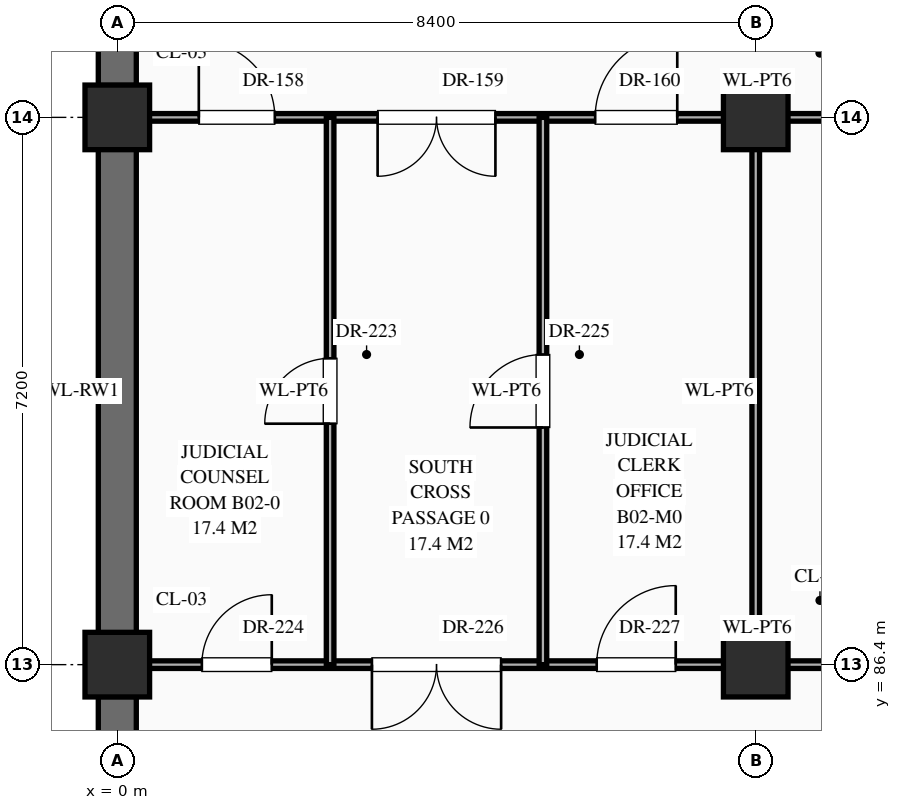
"""IFC4 building model, lengths in metres.
Left out: names, types, materials, properties, quantities, classifications, styles, units other than length and angle.
Written with IfcOpenShell. Run it as: python <this file> out.ifc"""

import sys

from ifc_helpers import new_model, si_unit, direction, frame, frame_2d, origin, origin_2d, place, context, subcontext, project, spatial, rectangle, extrude, element, fill, save


model = new_model("IFC4")
c1 = context("Model", 3, precision=1e-05, world=origin(), true_north=direction((0.0, 1.0)))
c2 = subcontext(c1, "Body", "Model", "MODEL_VIEW")
j1 = project(units=[si_unit("LENGTHUNIT", "METRE"), si_unit("PLANEANGLEUNIT", "RADIAN")], contexts=[c1])
p1 = place(None, origin())
s1 = spatial("IfcSite", under=j1, at=p1, CompositionType="ELEMENT")
p2 = place(p1, origin())
s2 = spatial("IfcBuilding", under=s1, at=p2, CompositionType="ELEMENT")
p3 = place(p2, frame((0.0, 0.0, -10.2)))
s3 = spatial("IfcBuildingStorey", under=s2, at=p3, CompositionType="ELEMENT", Elevation=-10.2)
for number, where, z_axis, x_axis in (
    (1, (0.0, 86.4, 0.0), (0.0, 0.0, 1.0), (1.0, 0.0, 0.0)),
    (2, (0.0, 93.6, 0.0), (0.0, 0.0, 1.0), (1.0, 0.0, 0.0)),
    (3, (8.4, 86.4, 0.0), (0.0, 0.0, 1.0), (1.0, 0.0, 0.0)),
    (4, (8.4, 93.6, 0.0), (0.0, 0.0, 1.0), (1.0, 0.0, 0.0)),
):
    element("IfcColumn", number, at=place(p3, frame(where, z_axis=z_axis, x_axis=x_axis)), inside=s3, PredefinedType="COLUMN", context=c2, shape_type="SweptSolid", body=[
        extrude(rectangle(XDim=0.85, YDim=0.85, at=origin_2d()), origin(), (0.0, 0.0, 1.0), 4.8),
    ])
for number, where, z_axis, x_axis in (
    (5, (0.0, 79.62, 0.0), (0.0, 0.0, 1.0), (0.0, 1.0, 0.0)),
    (6, (0.0, 86.82, 0.0), (0.0, 0.0, 1.0), (0.0, 1.0, 0.0)),
    (7, (0.0, 94.02, 0.0), (0.0, 0.0, 1.0), (0.0, 1.0, 0.0)),
):
    element("IfcWall", number, at=place(p3, frame(where, z_axis=z_axis, x_axis=x_axis)), inside=s3, PredefinedType="USERDEFINED", context=c2, shape_type="SweptSolid", body=[
        extrude(rectangle(XDim=6.36, YDim=0.5, at=frame_2d((3.18, 0.0))), origin(), (0.0, 0.0, 1.0), 4.48),
    ])
p4 = place(p3, frame((0.04, 86.4, 0.0), z_axis=(0.0, 0.0, 1.0), x_axis=(1.0, 0.0, 0.0)))
e8 = element("IfcWall", 8, at=p4, inside=s3, PredefinedType="STANDARD", context=c2, shape_type="SweptSolid", body=[
    extrude(rectangle(XDim=16.76, YDim=0.1, at=frame_2d((8.38, 0.0))), origin(), (0.0, 0.0, 1.0), 3.63),
])
p5 = place(p4, frame((1.073, 0.0, 0.0)))
e9 = element("IfcOpeningElement", 9, at=p5, cuts=e8, PredefinedType="OPENING", context=c2, shape_type="SweptSolid", body=[
    extrude(rectangle(XDim=0.92, YDim=2.15, at=frame_2d((0.46, 1.075))), frame((0.0, 0.062, 0.0), z_axis=(0.0, -1.0, 0.0), x_axis=(1.0, 0.0, 0.0)), (0.0, 0.0, 1.0), 0.124),
])
p6 = place(p4, frame((3.31, 0.0, 0.0)))
e10 = element("IfcOpeningElement", 10, at=p6, cuts=e8, PredefinedType="OPENING", context=c2, shape_type="SweptSolid", body=[
    extrude(rectangle(XDim=1.7, YDim=2.45, at=frame_2d((0.85, 1.225))), frame((0.0, 0.062, 0.0), z_axis=(0.0, -1.0, 0.0), x_axis=(1.0, 0.0, 0.0)), (0.0, 0.0, 1.0), 0.124),
])
p7 = place(p4, frame((6.268, 0.0, 0.0)))
e11 = element("IfcOpeningElement", 11, at=p7, cuts=e8, PredefinedType="OPENING", context=c2, shape_type="SweptSolid", body=[
    extrude(rectangle(XDim=1.04, YDim=2.2, at=frame_2d((0.52, 1.1))), frame((0.0, 0.062, 0.0), z_axis=(0.0, -1.0, 0.0), x_axis=(1.0, 0.0, 0.0)), (0.0, 0.0, 1.0), 0.124),
])
p8 = place(p4, frame((12.02, 0.0, 0.0)))
e12 = element("IfcOpeningElement", 12, at=p8, cuts=e8, PredefinedType="OPENING", context=c2, shape_type="SweptSolid", body=[
    extrude(rectangle(XDim=1.08, YDim=2.25, at=frame_2d((0.54, 1.125))), frame((0.0, 0.062, 0.0), z_axis=(0.0, -1.0, 0.0), x_axis=(1.0, 0.0, 0.0)), (0.0, 0.0, 1.0), 0.124),
])
p9 = place(p3, frame((0.04, 93.6, 0.0), z_axis=(0.0, 0.0, 1.0), x_axis=(1.0, 0.0, 0.0)))
e13 = element("IfcWall", 13, at=p9, inside=s3, PredefinedType="STANDARD", context=c2, shape_type="SweptSolid", body=[
    extrude(rectangle(XDim=16.76, YDim=0.1, at=frame_2d((8.38, 0.0))), origin(), (0.0, 0.0, 1.0), 3.63),
])
p10 = place(p9, frame((1.032, 0.0, 0.0)))
e14 = element("IfcOpeningElement", 14, at=p10, cuts=e13, PredefinedType="OPENING", context=c2, shape_type="SweptSolid", body=[
    extrude(rectangle(XDim=1.0, YDim=2.25, at=frame_2d((0.5, 1.125))), frame((0.0, 0.062, 0.0), z_axis=(0.0, -1.0, 0.0), x_axis=(1.0, 0.0, 0.0)), (0.0, 0.0, 1.0), 0.124),
])
p11 = place(p9, frame((3.385, 0.0, 0.0)))
e15 = element("IfcOpeningElement", 15, at=p11, cuts=e13, PredefinedType="OPENING", context=c2, shape_type="SweptSolid", body=[
    extrude(rectangle(XDim=1.55, YDim=2.35, at=frame_2d((0.775, 1.175))), frame((0.0, 0.062, 0.0), z_axis=(0.0, -1.0, 0.0), x_axis=(1.0, 0.0, 0.0)), (0.0, 0.0, 1.0), 0.124),
])
p12 = place(p9, frame((6.248, 0.0, 0.0)))
e16 = element("IfcOpeningElement", 16, at=p12, cuts=e13, PredefinedType="OPENING", context=c2, shape_type="SweptSolid", body=[
    extrude(rectangle(XDim=1.08, YDim=2.25, at=frame_2d((0.54, 1.125))), frame((0.0, 0.062, 0.0), z_axis=(0.0, -1.0, 0.0), x_axis=(1.0, 0.0, 0.0)), (0.0, 0.0, 1.0), 0.124),
])
p13 = place(p9, frame((12.0, 0.0, 0.0)))
e17 = element("IfcOpeningElement", 17, at=p13, cuts=e13, PredefinedType="OPENING", context=c2, shape_type="SweptSolid", body=[
    extrude(rectangle(XDim=1.12, YDim=2.25, at=frame_2d((0.56, 1.125))), frame((0.0, 0.062, 0.0), z_axis=(0.0, -1.0, 0.0), x_axis=(1.0, 0.0, 0.0)), (0.0, 0.0, 1.0), 0.124),
])
p14 = place(p3, frame((2.8, 86.4, 0.0), z_axis=(0.0, 0.0, 1.0), x_axis=(0.0, 1.0, 0.0)))
e18 = element("IfcWall", 18, at=p14, inside=s3, PredefinedType="STANDARD", context=c2, shape_type="SweptSolid", body=[
    extrude(rectangle(XDim=7.2, YDim=0.1, at=frame_2d((3.6, 0.0))), origin(), (0.0, 0.0, 1.0), 4.48),
])
p15 = place(p14, frame((3.17, 0.0, 0.0)))
e19 = element("IfcOpeningElement", 19, at=p15, cuts=e18, PredefinedType="OPENING", context=c2, shape_type="SweptSolid", body=[
    extrude(rectangle(XDim=0.86, YDim=2.1, at=frame_2d((0.43, 1.05))), frame((0.0, 0.062, 0.0), z_axis=(0.0, -1.0, 0.0), x_axis=(1.0, 0.0, 0.0)), (0.0, 0.0, 1.0), 0.124),
])
p16 = place(p3, frame((5.6, 86.4, 0.0), z_axis=(0.0, 0.0, 1.0), x_axis=(0.0, 1.0, 0.0)))
e20 = element("IfcWall", 20, at=p16, inside=s3, PredefinedType="STANDARD", context=c2, shape_type="SweptSolid", body=[
    extrude(rectangle(XDim=7.2, YDim=0.1, at=frame_2d((3.6, 0.0))), origin(), (0.0, 0.0, 1.0), 4.48),
])
p17 = place(p16, frame((3.12, 0.0, 0.0)))
e21 = element("IfcOpeningElement", 21, at=p17, cuts=e20, PredefinedType="OPENING", context=c2, shape_type="SweptSolid", body=[
    extrude(rectangle(XDim=0.96, YDim=2.2, at=frame_2d((0.48, 1.1))), frame((0.0, 0.062, 0.0), z_axis=(0.0, -1.0, 0.0), x_axis=(1.0, 0.0, 0.0)), (0.0, 0.0, 1.0), 0.124),
])
p18 = place(p3, frame((8.4, 86.4, 0.0), z_axis=(0.0, 0.0, 1.0), x_axis=(0.0, 1.0, 0.0)))
e22 = element("IfcWall", 22, at=p18, inside=s3, PredefinedType="STANDARD", context=c2, shape_type="SweptSolid", body=[
    extrude(rectangle(XDim=7.2, YDim=0.1, at=frame_2d((3.6, 0.0))), origin(), (0.0, 0.0, 1.0), 3.73),
])
p19 = place(p10, origin())
e23 = element("IfcDoor", 23, at=p19, inside=s3, OperationType="SINGLE_SWING_LEFT", PredefinedType="DOOR", context=c2, shape_type="SweptSolid", body=[
    extrude(rectangle(XDim=1.0, YDim=2.25, at=frame_2d((0.5, 1.125))), frame((0.0, 0.025, 0.0), z_axis=(0.0, -1.0, 0.0), x_axis=(1.0, 0.0, 0.0)), (0.0, 0.0, 1.0), 0.05),
])
fill(e14, e23)
p20 = place(p11, frame((1.55, 0.0, 0.0), z_axis=(0.0, 0.0, 1.0), x_axis=(-1.0, 0.0, 0.0)))
e24 = element("IfcDoor", 24, at=p20, inside=s3, OperationType="DOUBLE_DOOR_SINGLE_SWING", PredefinedType="DOOR", context=c2, shape_type="SweptSolid", body=[
    extrude(rectangle(XDim=1.55, YDim=2.35, at=frame_2d((0.775, 1.175))), frame((0.0, 0.025, 0.0), z_axis=(0.0, -1.0, 0.0), x_axis=(1.0, 0.0, 0.0)), (0.0, 0.0, 1.0), 0.05),
])
fill(e15, e24)
p21 = place(p12, origin())
e25 = element("IfcDoor", 25, at=p21, inside=s3, OperationType="SINGLE_SWING_RIGHT", PredefinedType="DOOR", context=c2, shape_type="SweptSolid", body=[
    extrude(rectangle(XDim=1.08, YDim=2.25, at=frame_2d((0.54, 1.125))), frame((0.0, 0.025, 0.0), z_axis=(0.0, -1.0, 0.0), x_axis=(1.0, 0.0, 0.0)), (0.0, 0.0, 1.0), 0.05),
])
fill(e16, e25)
p22 = place(p15, origin())
e26 = element("IfcDoor", 26, at=p22, inside=s3, OperationType="SINGLE_SWING_LEFT", PredefinedType="DOOR", context=c2, shape_type="SweptSolid", body=[
    extrude(rectangle(XDim=0.86, YDim=2.1, at=frame_2d((0.43, 1.05))), frame((0.0, 0.025, 0.0), z_axis=(0.0, -1.0, 0.0), x_axis=(1.0, 0.0, 0.0)), (0.0, 0.0, 1.0), 0.05),
])
fill(e19, e26)
p23 = place(p5, origin())
e27 = element("IfcDoor", 27, at=p23, inside=s3, OperationType="SINGLE_SWING_RIGHT", PredefinedType="DOOR", context=c2, shape_type="SweptSolid", body=[
    extrude(rectangle(XDim=0.92, YDim=2.15, at=frame_2d((0.46, 1.075))), frame((0.0, 0.025, 0.0), z_axis=(0.0, -1.0, 0.0), x_axis=(1.0, 0.0, 0.0)), (0.0, 0.0, 1.0), 0.05),
])
fill(e9, e27)
p24 = place(p17, origin())
e28 = element("IfcDoor", 28, at=p24, inside=s3, OperationType="SINGLE_SWING_LEFT", PredefinedType="DOOR", context=c2, shape_type="SweptSolid", body=[
    extrude(rectangle(XDim=0.96, YDim=2.2, at=frame_2d((0.48, 1.1))), frame((0.0, 0.025, 0.0), z_axis=(0.0, -1.0, 0.0), x_axis=(1.0, 0.0, 0.0)), (0.0, 0.0, 1.0), 0.05),
])
fill(e21, e28)
p25 = place(p6, frame((1.7, 0.0, 0.0), z_axis=(0.0, 0.0, 1.0), x_axis=(-1.0, 0.0, 0.0)))
e29 = element("IfcDoor", 29, at=p25, inside=s3, OperationType="DOUBLE_DOOR_SINGLE_SWING", PredefinedType="DOOR", context=c2, shape_type="SweptSolid", body=[
    extrude(rectangle(XDim=1.7, YDim=2.45, at=frame_2d((0.85, 1.225))), frame((0.0, 0.025, 0.0), z_axis=(0.0, -1.0, 0.0), x_axis=(1.0, 0.0, 0.0)), (0.0, 0.0, 1.0), 0.05),
])
fill(e10, e29)
p26 = place(p7, origin())
e30 = element("IfcDoor", 30, at=p26, inside=s3, OperationType="SINGLE_SWING_RIGHT", PredefinedType="DOOR", context=c2, shape_type="SweptSolid", body=[
    extrude(rectangle(XDim=1.04, YDim=2.2, at=frame_2d((0.52, 1.1))), frame((0.0, 0.025, 0.0), z_axis=(0.0, -1.0, 0.0), x_axis=(1.0, 0.0, 0.0)), (0.0, 0.0, 1.0), 0.05),
])
fill(e11, e30)
save(model, sys.argv[1])
